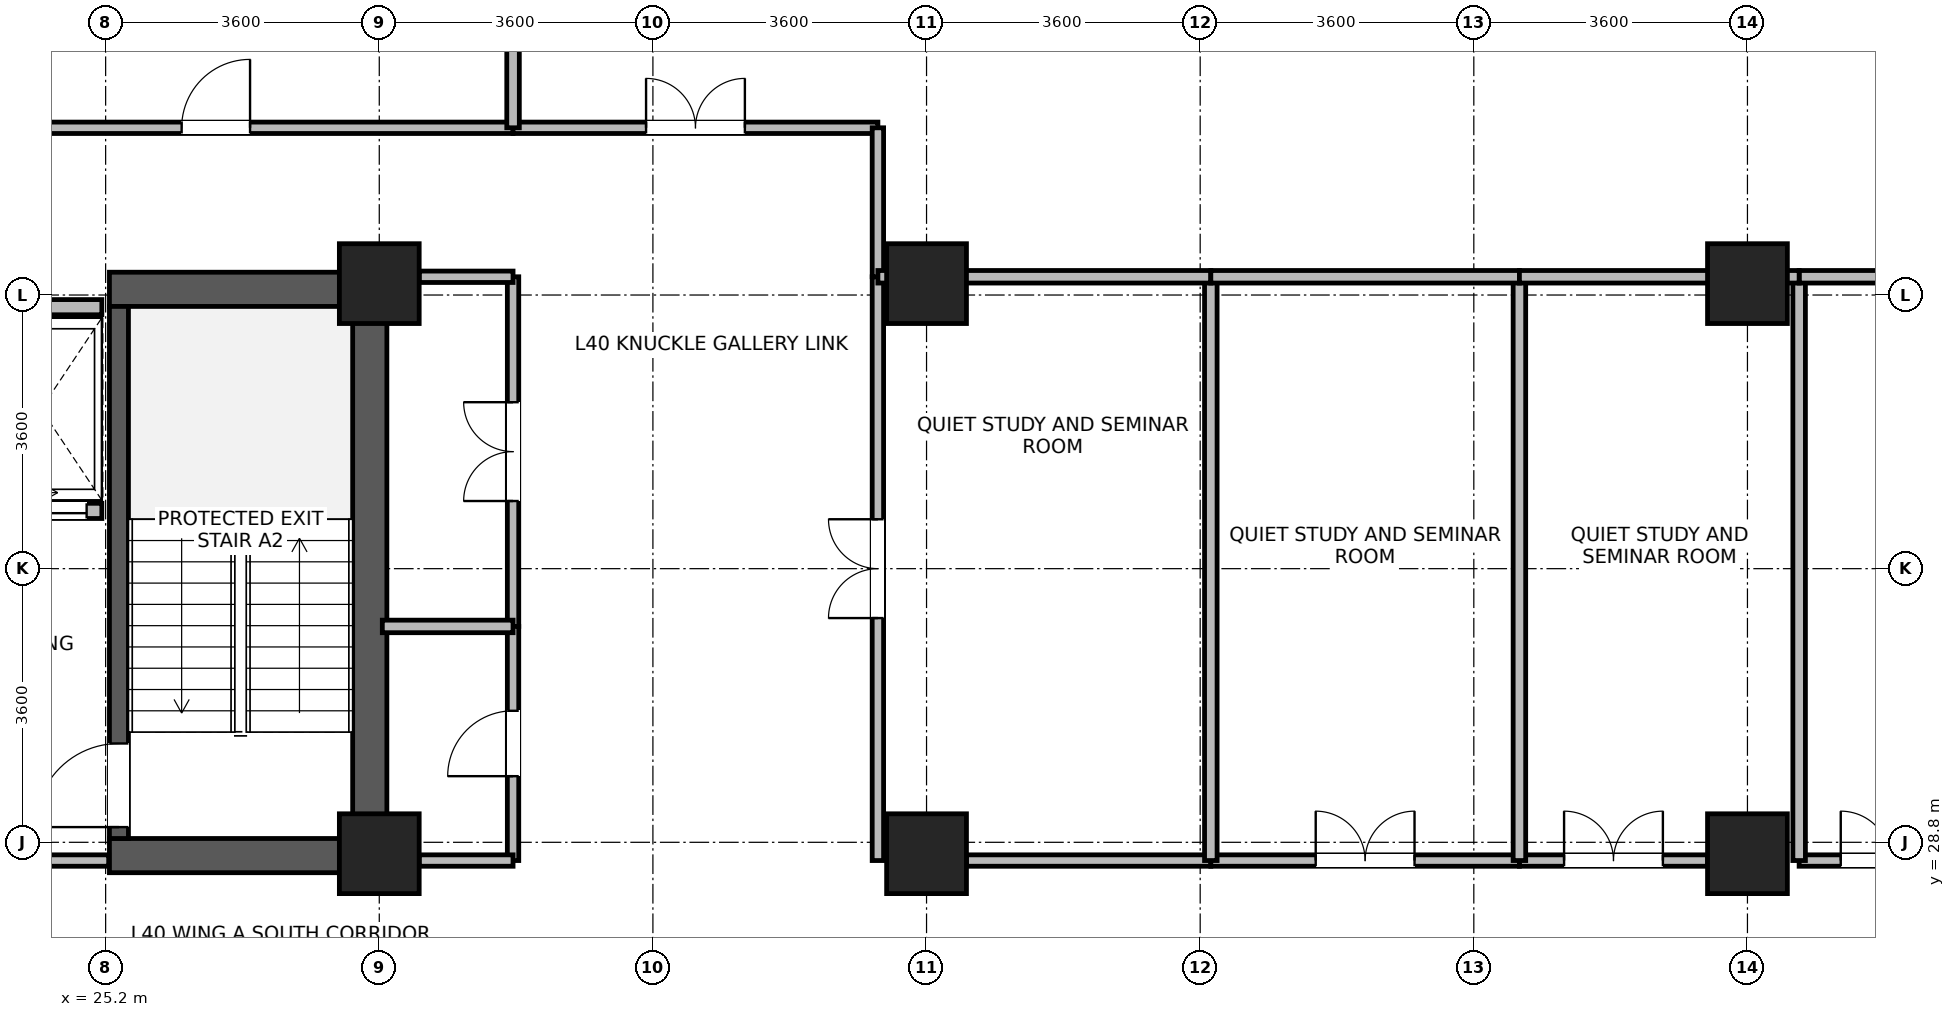
"""IFC4 building model, lengths in metres.
Left out: names, types, materials, properties, quantities, classifications, styles, units other than length and angle.
Written with IfcOpenShell. Run it as: python <this file> out.ifc"""

import sys

from ifc_helpers import new_model, si_unit, direction, frame, frame_2d, origin, origin_2d, place, context, subcontext, project, spatial, rectangle, extrude, source, transform, mapped, element, fill, save


model = new_model("IFC4")
c1 = context("Model", 3, precision=1e-05, world=origin(), true_north=direction((0.0, 1.0)))
c2 = subcontext(c1, "Body", "Model", "MODEL_VIEW")
j1 = project(units=[si_unit("LENGTHUNIT", "METRE"), si_unit("PLANEANGLEUNIT", "RADIAN")], contexts=[c1])
p1 = place(None, origin())
s1 = spatial("IfcSite", under=j1, at=p1, CompositionType="ELEMENT")
p2 = place(p1, origin())
s2 = spatial("IfcBuilding", under=s1, at=p2, CompositionType="ELEMENT")
p3 = place(p2, frame((0.0, 0.0, 158.7)))
s3 = spatial("IfcBuildingStorey", under=s2, at=p3, CompositionType="ELEMENT", Elevation=158.7)
p4 = place(p3, frame((28.675, 28.4, 0.0), z_axis=(0.0, 0.0, 1.0), x_axis=(0.0, 1.0, 0.0)))
e1 = element("IfcWall", 1, at=p4, inside=s3, PredefinedType="SHEAR", context=c2, shape_type="SweptSolid", body=[
    extrude(rectangle(XDim=7.9, YDim=0.45, at=frame_2d((3.95, 0.0))), origin(), (0.0, 0.0, 1.0), 3.46),
])
for number, where, z_axis, x_axis in (
    (2, (25.25, 28.625, 0.0), (0.0, 0.0, 1.0), (1.0, 0.0, 0.0)),
    (3, (25.25, 36.075, 0.0), (0.0, 0.0, 1.0), (1.0, 0.0, 0.0)),
):
    element("IfcWall", number, at=place(p3, frame(where, z_axis=z_axis, x_axis=x_axis)), inside=s3, PredefinedType="SHEAR", context=c2, shape_type="SweptSolid", body=[
        extrude(rectangle(XDim=3.2, YDim=0.45, at=frame_2d((1.6, 0.0))), origin(), (0.0, 0.0, 1.0), 3.46),
    ])
p5 = place(p3, frame((25.375, 28.85, 0.0), z_axis=(0.0, 0.0, 1.0), x_axis=(0.0, 1.0, 0.0)))
e4 = element("IfcWall", 4, at=p5, inside=s3, PredefinedType="SHEAR", context=c2, shape_type="SweptSolid", body=[
    extrude(rectangle(XDim=7.0, YDim=0.25, at=frame_2d((3.5, 0.0))), origin(), (0.0, 0.0, 1.0), 3.46),
])
p6 = place(p5, frame((0.15, 0.0, 0.0)))
e5 = element("IfcOpeningElement", 5, at=p6, cuts=e4, PredefinedType="OPENING", context=c2, shape_type="SweptSolid", body=[
    extrude(rectangle(XDim=1.1, YDim=2.08, at=frame_2d((0.55, 1.04))), frame((0.0, 0.135, 0.0), z_axis=(0.0, -1.0, 0.0), x_axis=(1.0, 0.0, 0.0)), (0.0, 0.0, 1.0), 0.27),
])
m1 = source(origin(), c2, "Body", "SweptSolid", [
    extrude(rectangle(XDim=1.05, YDim=1.05, at=origin_2d()), origin(), (0.0, 0.0, 1.0), 3.7),
])
for number, where, z_axis, x_axis in (
    (6, (28.8, 28.65, 0.0), (0.0, 0.0, 1.0), (1.0, 0.0, 0.0)),
    (7, (28.8, 36.15, 0.0), (0.0, 0.0, 1.0), (1.0, 0.0, 0.0)),
    (8, (36.0, 28.65, 0.0), (0.0, 0.0, 1.0), (1.0, 0.0, 0.0)),
    (9, (36.0, 36.15, 0.0), (0.0, 0.0, 1.0), (1.0, 0.0, 0.0)),
    (10, (46.8, 28.65, 0.0), (0.0, 0.0, 1.0), (1.0, 0.0, 0.0)),
    (11, (46.8, 36.15, 0.0), (0.0, 0.0, 1.0), (1.0, 0.0, 0.0)),
):
    element("IfcColumn", number, at=place(p3, frame(where, z_axis=z_axis, x_axis=x_axis)), inside=s3, PredefinedType="COLUMN", context=c2, shape_type="MappedRepresentation", body=[
        mapped(m1, transform((0.0, 0.0, 0.0), x_axis=(1.0, 0.0, 0.0), y_axis=(0.0, 1.0, 0.0), z_axis=(0.0, 0.0, 1.0), scale=1.0)),
    ])
p7 = place(p3, frame((23.55, 33.16, 0.0), z_axis=(0.0, 0.0, 1.0), x_axis=(1.0, 0.0, 0.0)))
e12 = element("IfcWall", 12, at=p7, inside=s3, PredefinedType="PARTITIONING", context=c2, shape_type="SweptSolid", body=[
    extrude(rectangle(XDim=1.6, YDim=0.2, at=frame_2d((0.8, 0.0))), origin(), (0.0, 0.0, 1.0), 3.44),
])
p8 = place(p7, frame((0.2, 0.0, 0.0)))
e13 = element("IfcOpeningElement", 13, at=p8, cuts=e12, PredefinedType="OPENING", context=c2, shape_type="SweptSolid", body=[
    extrude(rectangle(XDim=1.2, YDim=2.12, at=frame_2d((0.6, 1.06))), frame((0.0, 0.11, 0.0), z_axis=(0.0, -1.0, 0.0), x_axis=(1.0, 0.0, 0.0)), (0.0, 0.0, 1.0), 0.22),
])
p9 = place(p3, frame((23.55, 35.84, 0.0), z_axis=(0.0, 0.0, 1.0), x_axis=(1.0, 0.0, 0.0)))
e14 = element("IfcWall", 14, at=p9, inside=s3, PredefinedType="PARTITIONING", context=c2, shape_type="SweptSolid", body=[
    extrude(rectangle(XDim=1.6, YDim=0.2, at=frame_2d((0.8, 0.0))), origin(), (0.0, 0.0, 1.0), 2.44),
])
p10 = place(p3, frame((22.74, 38.2, 0.0), z_axis=(0.0, 0.0, 1.0), x_axis=(1.0, 0.0, 0.0)))
e15 = element("IfcWall", 15, at=p10, inside=s3, PredefinedType="PARTITIONING", context=c2, shape_type="SweptSolid", body=[
    extrude(rectangle(XDim=7.82, YDim=0.15, at=frame_2d((3.91, 0.0))), origin(), (0.0, 0.0, 1.0), 3.44),
])
p11 = place(p10, frame((3.46, 0.0, 0.0)))
e16 = element("IfcOpeningElement", 16, at=p11, cuts=e15, PredefinedType="OPENING", context=c2, shape_type="SweptSolid", body=[
    extrude(rectangle(XDim=0.9, YDim=2.08, at=frame_2d((0.45, 1.04))), frame((0.0, 0.085, 0.0), z_axis=(0.0, -1.0, 0.0), x_axis=(1.0, 0.0, 0.0)), (0.0, 0.0, 1.0), 0.17),
])
p12 = place(p3, frame((35.36, 28.56, 0.0), z_axis=(0.0, 0.0, 1.0), x_axis=(0.0, 1.0, 0.0)))
e17 = element("IfcWall", 17, at=p12, inside=s3, PredefinedType="PARTITIONING", context=c2, shape_type="SweptSolid", body=[
    extrude(rectangle(XDim=7.68, YDim=0.15, at=frame_2d((3.84, 0.0))), origin(), (0.0, 0.0, 1.0), 3.44),
])
p13 = place(p12, frame((3.19, 0.0, 0.0)))
e18 = element("IfcOpeningElement", 18, at=p13, cuts=e17, PredefinedType="OPENING", context=c2, shape_type="SweptSolid", body=[
    extrude(rectangle(XDim=1.3, YDim=2.12, at=frame_2d((0.65, 1.06))), frame((0.0, 0.085, 0.0), z_axis=(0.0, -1.0, 0.0), x_axis=(1.0, 0.0, 0.0)), (0.0, 0.0, 1.0), 0.17),
])
p14 = place(p3, frame((47.48, 28.56, 0.0), z_axis=(0.0, 0.0, 1.0), x_axis=(1.0, 0.0, 0.0)))
e19 = element("IfcWall", 19, at=p14, inside=s3, PredefinedType="PARTITIONING", context=c2, shape_type="SweptSolid", body=[
    extrude(rectangle(XDim=2.395, YDim=0.15, at=frame_2d((1.198, 0.0))), origin(), (0.0, 0.0, 1.0), 2.84),
])
p15 = place(p14, frame((0.548, 0.0, 0.0)))
e20 = element("IfcOpeningElement", 20, at=p15, cuts=e19, PredefinedType="OPENING", context=c2, shape_type="SweptSolid", body=[
    extrude(rectangle(XDim=1.3, YDim=2.12, at=frame_2d((0.65, 1.06))), frame((0.0, 0.085, 0.0), z_axis=(0.0, -1.0, 0.0), x_axis=(1.0, 0.0, 0.0)), (0.0, 0.0, 1.0), 0.17),
])
p16 = place(p3, frame((30.56, 38.2, 0.0), z_axis=(0.0, 0.0, 1.0), x_axis=(1.0, 0.0, 0.0)))
e21 = element("IfcWall", 21, at=p16, inside=s3, PredefinedType="PARTITIONING", context=c2, shape_type="SweptSolid", body=[
    extrude(rectangle(XDim=4.8, YDim=0.15, at=frame_2d((2.4, 0.0))), origin(), (0.0, 0.0, 1.0), 3.44),
])
p17 = place(p16, frame((1.75, 0.0, 0.0)))
e22 = element("IfcOpeningElement", 22, at=p17, cuts=e21, PredefinedType="OPENING", context=c2, shape_type="SweptSolid", body=[
    extrude(rectangle(XDim=1.3, YDim=2.12, at=frame_2d((0.65, 1.06))), frame((0.0, 0.085, 0.0), z_axis=(0.0, -1.0, 0.0), x_axis=(1.0, 0.0, 0.0)), (0.0, 0.0, 1.0), 0.17),
])
p18 = place(p3, frame((30.56, 31.64, 0.0), z_axis=(0.0, 0.0, 1.0), x_axis=(0.0, 1.0, 0.0)))
e23 = element("IfcWall", 23, at=p18, inside=s3, PredefinedType="PARTITIONING", context=c2, shape_type="SweptSolid", body=[
    extrude(rectangle(XDim=4.6, YDim=0.15, at=frame_2d((2.3, 0.0))), origin(), (0.0, 0.0, 1.0), 3.44),
])
p19 = place(p18, frame((1.65, 0.0, 0.0)))
e24 = element("IfcOpeningElement", 24, at=p19, cuts=e23, PredefinedType="OPENING", context=c2, shape_type="SweptSolid", body=[
    extrude(rectangle(XDim=1.3, YDim=2.12, at=frame_2d((0.65, 1.06))), frame((0.0, 0.085, 0.0), z_axis=(0.0, -1.0, 0.0), x_axis=(1.0, 0.0, 0.0)), (0.0, 0.0, 1.0), 0.17),
])
p20 = place(p3, frame((36.525, 28.56, 0.0), z_axis=(0.0, 0.0, 1.0), x_axis=(1.0, 0.0, 0.0)))
e25 = element("IfcWall", 25, at=p20, inside=s3, PredefinedType="PARTITIONING", context=c2, shape_type="SweptSolid", body=[
    extrude(rectangle(XDim=3.215, YDim=0.15, at=frame_2d((1.607, 0.0))), origin(), (0.0, 0.0, 1.0), 2.84),
])
p21 = place(p3, frame((39.74, 28.56, 0.0), z_axis=(0.0, 0.0, 1.0), x_axis=(1.0, 0.0, 0.0)))
e26 = element("IfcWall", 26, at=p21, inside=s3, PredefinedType="PARTITIONING", context=c2, shape_type="SweptSolid", body=[
    extrude(rectangle(XDim=4.06, YDim=0.15, at=frame_2d((2.03, 0.0))), origin(), (0.0, 0.0, 1.0), 2.84),
])
p22 = place(p21, frame((1.38, 0.0, 0.0)))
e27 = element("IfcOpeningElement", 27, at=p22, cuts=e26, PredefinedType="OPENING", context=c2, shape_type="SweptSolid", body=[
    extrude(rectangle(XDim=1.3, YDim=2.12, at=frame_2d((0.65, 1.06))), frame((0.0, 0.085, 0.0), z_axis=(0.0, -1.0, 0.0), x_axis=(1.0, 0.0, 0.0)), (0.0, 0.0, 1.0), 0.17),
])
p23 = place(p3, frame((43.8, 28.56, 0.0), z_axis=(0.0, 0.0, 1.0), x_axis=(1.0, 0.0, 0.0)))
e28 = element("IfcWall", 28, at=p23, inside=s3, PredefinedType="PARTITIONING", context=c2, shape_type="SweptSolid", body=[
    extrude(rectangle(XDim=2.475, YDim=0.15, at=frame_2d((1.237, 0.0))), origin(), (0.0, 0.0, 1.0), 2.84),
])
p24 = place(p23, frame((0.587, 0.0, 0.0)))
e29 = element("IfcOpeningElement", 29, at=p24, cuts=e28, PredefinedType="OPENING", context=c2, shape_type="SweptSolid", body=[
    extrude(rectangle(XDim=1.3, YDim=2.12, at=frame_2d((0.65, 1.06))), frame((0.0, 0.085, 0.0), z_axis=(0.0, -1.0, 0.0), x_axis=(1.0, 0.0, 0.0)), (0.0, 0.0, 1.0), 0.17),
])
p25 = place(p3, frame((30.56, 28.56, 0.0), z_axis=(0.0, 0.0, 1.0), x_axis=(0.0, 1.0, 0.0)))
e30 = element("IfcWall", 30, at=p25, inside=s3, PredefinedType="PARTITIONING", context=c2, shape_type="SweptSolid", body=[
    extrude(rectangle(XDim=3.08, YDim=0.15, at=frame_2d((1.54, 0.0))), origin(), (0.0, 0.0, 1.0), 3.44),
])
p26 = place(p25, frame((1.11, 0.0, 0.0)))
e31 = element("IfcOpeningElement", 31, at=p26, cuts=e30, PredefinedType="OPENING", context=c2, shape_type="SweptSolid", body=[
    extrude(rectangle(XDim=0.86, YDim=2.02, at=frame_2d((0.43, 1.01))), frame((0.0, 0.085, 0.0), z_axis=(0.0, -1.0, 0.0), x_axis=(1.0, 0.0, 0.0)), (0.0, 0.0, 1.0), 0.17),
])
p27 = place(p3, frame((35.36, 36.24, 0.0), z_axis=(0.0, 0.0, 1.0), x_axis=(0.0, 1.0, 0.0)))
e32 = element("IfcWall", 32, at=p27, inside=s3, PredefinedType="PARTITIONING", context=c2, shape_type="SweptSolid", body=[
    extrude(rectangle(XDim=1.96, YDim=0.15, at=frame_2d((0.98, 0.0))), origin(), (0.0, 0.0, 1.0), 3.44),
])
for number, where, z_axis, x_axis in (
    (33, (29.325, 28.56, 0.0), (0.0, 0.0, 1.0), (1.0, 0.0, 0.0)),
    (34, (29.325, 36.24, 0.0), (0.0, 0.0, 1.0), (1.0, 0.0, 0.0)),
):
    element("IfcWall", number, at=place(p3, frame(where, z_axis=z_axis, x_axis=x_axis)), inside=s3, PredefinedType="PARTITIONING", context=c2, shape_type="SweptSolid", body=[
        extrude(rectangle(XDim=1.235, YDim=0.15, at=frame_2d((0.618, 0.0))), origin(), (0.0, 0.0, 1.0), 2.84),
    ])
for number, where, z_axis, x_axis in (
    (35, (39.74, 28.56, 0.0), (0.0, 0.0, 1.0), (0.0, 1.0, 0.0)),
    (36, (43.8, 28.56, 0.0), (0.0, 0.0, 1.0), (0.0, 1.0, 0.0)),
    (37, (47.48, 28.56, 0.0), (0.0, 0.0, 1.0), (0.0, 1.0, 0.0)),
):
    element("IfcWall", number, at=place(p3, frame(where, z_axis=z_axis, x_axis=x_axis)), inside=s3, PredefinedType="PARTITIONING", context=c2, shape_type="SweptSolid", body=[
        extrude(rectangle(XDim=7.68, YDim=0.165, at=frame_2d((3.84, 0.0))), origin(), (0.0, 0.0, 1.0), 3.44),
    ])
p28 = place(p3, frame((47.48, 36.24, 0.0), z_axis=(0.0, 0.0, 1.0), x_axis=(1.0, 0.0, 0.0)))
e38 = element("IfcWall", 38, at=p28, inside=s3, PredefinedType="PARTITIONING", context=c2, shape_type="SweptSolid", body=[
    extrude(rectangle(XDim=6.888, YDim=0.165, at=frame_2d((3.444, 0.0))), origin(), (0.0, 0.0, 1.0), 2.84),
])
p29 = place(p3, frame((30.56, 38.2, 0.0), z_axis=(0.0, 0.0, 1.0), x_axis=(0.0, 1.0, 0.0)))
e39 = element("IfcWall", 39, at=p29, inside=s3, PredefinedType="PARTITIONING", context=c2, shape_type="SweptSolid", body=[
    extrude(rectangle(XDim=4.868, YDim=0.165, at=frame_2d((2.434, 0.0))), origin(), (0.0, 0.0, 1.0), 3.44),
])
p30 = place(p3, frame((35.36, 36.24, 0.0), z_axis=(0.0, 0.0, 1.0), x_axis=(1.0, 0.0, 0.0)))
e40 = element("IfcWall", 40, at=p30, inside=s3, PredefinedType="PARTITIONING", context=c2, shape_type="SweptSolid", body=[
    extrude(rectangle(XDim=4.38, YDim=0.165, at=frame_2d((2.19, 0.0))), origin(), (0.0, 0.0, 1.0), 2.84),
])
p31 = place(p3, frame((39.74, 36.24, 0.0), z_axis=(0.0, 0.0, 1.0), x_axis=(1.0, 0.0, 0.0)))
e41 = element("IfcWall", 41, at=p31, inside=s3, PredefinedType="PARTITIONING", context=c2, shape_type="SweptSolid", body=[
    extrude(rectangle(XDim=4.06, YDim=0.165, at=frame_2d((2.03, 0.0))), origin(), (0.0, 0.0, 1.0), 2.84),
])
p32 = place(p3, frame((43.8, 36.24, 0.0), z_axis=(0.0, 0.0, 1.0), x_axis=(1.0, 0.0, 0.0)))
e42 = element("IfcWall", 42, at=p32, inside=s3, PredefinedType="PARTITIONING", context=c2, shape_type="SweptSolid", body=[
    extrude(rectangle(XDim=3.68, YDim=0.165, at=frame_2d((1.84, 0.0))), origin(), (0.0, 0.0, 1.0), 2.84),
])
p33 = place(p3, frame((21.76, 28.56, 0.0), z_axis=(0.0, 0.0, 1.0), x_axis=(1.0, 0.0, 0.0)))
e43 = element("IfcWall", 43, at=p33, inside=s3, PredefinedType="PARTITIONING", context=c2, shape_type="SweptSolid", body=[
    extrude(rectangle(XDim=3.48, YDim=0.15, at=frame_2d((1.74, 0.0))), origin(), (0.0, 0.0, 1.0), 2.44),
])
p34 = place(p33, frame((0.99, 0.0, 0.0)))
e44 = element("IfcOpeningElement", 44, at=p34, cuts=e43, PredefinedType="OPENING", context=c2, shape_type="SweptSolid", body=[
    extrude(rectangle(XDim=1.5, YDim=2.1, at=frame_2d((0.75, 1.05))), frame((0.0, 0.085, 0.0), z_axis=(0.0, -1.0, 0.0), x_axis=(1.0, 0.0, 0.0)), (0.0, 0.0, 1.0), 0.17),
])
p35 = place(p3, frame((28.84, 31.64, 0.0), z_axis=(0.0, 0.0, 1.0), x_axis=(1.0, 0.0, 0.0)))
e45 = element("IfcWall", 45, at=p35, inside=s3, PredefinedType="PARTITIONING", context=c2, shape_type="SweptSolid", body=[
    extrude(rectangle(XDim=1.72, YDim=0.165, at=frame_2d((0.86, 0.0))), origin(), (0.0, 0.0, 1.0), 3.44),
])
p36 = place(p6, origin())
e46 = element("IfcDoor", 46, at=p36, inside=s3, OperationType="SINGLE_SWING_LEFT", PredefinedType="DOOR", context=c2, shape_type="SweptSolid", body=[
    extrude(rectangle(XDim=1.1, YDim=2.08, at=frame_2d((0.55, 1.04))), frame((0.0, 0.025, 0.0), z_axis=(0.0, -1.0, 0.0), x_axis=(1.0, 0.0, 0.0)), (0.0, 0.0, 1.0), 0.05),
])
fill(e5, e46)
p37 = place(p8, origin())
e47 = element("IfcDoor", 47, at=p37, inside=s3, OperationType="SLIDING_TO_RIGHT", PredefinedType="DOOR", context=c2, shape_type="SweptSolid", body=[
    extrude(rectangle(XDim=1.2, YDim=2.12, at=frame_2d((0.6, 1.06))), frame((0.0, 0.025, 0.0), z_axis=(0.0, -1.0, 0.0), x_axis=(1.0, 0.0, 0.0)), (0.0, 0.0, 1.0), 0.05),
])
fill(e13, e47)
p38 = place(p11, origin())
e48 = element("IfcDoor", 48, at=p38, inside=s3, OperationType="SINGLE_SWING_RIGHT", PredefinedType="DOOR", context=c2, shape_type="SweptSolid", body=[
    extrude(rectangle(XDim=0.9, YDim=2.08, at=frame_2d((0.45, 1.04))), frame((0.0, 0.025, 0.0), z_axis=(0.0, -1.0, 0.0), x_axis=(1.0, 0.0, 0.0)), (0.0, 0.0, 1.0), 0.05),
])
fill(e16, e48)
p39 = place(p13, origin())
e49 = element("IfcDoor", 49, at=p39, inside=s3, OperationType="DOUBLE_DOOR_SINGLE_SWING", PredefinedType="DOOR", context=c2, shape_type="SweptSolid", body=[
    extrude(rectangle(XDim=1.3, YDim=2.12, at=frame_2d((0.65, 1.06))), frame((0.0, 0.025, 0.0), z_axis=(0.0, -1.0, 0.0), x_axis=(1.0, 0.0, 0.0)), (0.0, 0.0, 1.0), 0.05),
])
fill(e18, e49)
p40 = place(p15, origin())
e50 = element("IfcDoor", 50, at=p40, inside=s3, OperationType="DOUBLE_DOOR_SINGLE_SWING", PredefinedType="DOOR", context=c2, shape_type="SweptSolid", body=[
    extrude(rectangle(XDim=1.3, YDim=2.12, at=frame_2d((0.65, 1.06))), frame((0.0, 0.025, 0.0), z_axis=(0.0, -1.0, 0.0), x_axis=(1.0, 0.0, 0.0)), (0.0, 0.0, 1.0), 0.05),
])
fill(e20, e50)
p41 = place(p17, origin())
e51 = element("IfcDoor", 51, at=p41, inside=s3, OperationType="DOUBLE_DOOR_SINGLE_SWING", PredefinedType="DOOR", context=c2, shape_type="SweptSolid", body=[
    extrude(rectangle(XDim=1.3, YDim=2.12, at=frame_2d((0.65, 1.06))), frame((0.0, 0.025, 0.0), z_axis=(0.0, -1.0, 0.0), x_axis=(1.0, 0.0, 0.0)), (0.0, 0.0, 1.0), 0.05),
])
fill(e22, e51)
p42 = place(p19, origin())
e52 = element("IfcDoor", 52, at=p42, inside=s3, OperationType="DOUBLE_DOOR_SINGLE_SWING", PredefinedType="DOOR", context=c2, shape_type="SweptSolid", body=[
    extrude(rectangle(XDim=1.3, YDim=2.12, at=frame_2d((0.65, 1.06))), frame((0.0, 0.025, 0.0), z_axis=(0.0, -1.0, 0.0), x_axis=(1.0, 0.0, 0.0)), (0.0, 0.0, 1.0), 0.05),
])
fill(e24, e52)
p43 = place(p22, origin())
e53 = element("IfcDoor", 53, at=p43, inside=s3, OperationType="DOUBLE_DOOR_SINGLE_SWING", PredefinedType="DOOR", context=c2, shape_type="SweptSolid", body=[
    extrude(rectangle(XDim=1.3, YDim=2.12, at=frame_2d((0.65, 1.06))), frame((0.0, 0.025, 0.0), z_axis=(0.0, -1.0, 0.0), x_axis=(1.0, 0.0, 0.0)), (0.0, 0.0, 1.0), 0.05),
])
fill(e27, e53)
p44 = place(p24, origin())
e54 = element("IfcDoor", 54, at=p44, inside=s3, OperationType="DOUBLE_DOOR_SINGLE_SWING", PredefinedType="DOOR", context=c2, shape_type="SweptSolid", body=[
    extrude(rectangle(XDim=1.3, YDim=2.12, at=frame_2d((0.65, 1.06))), frame((0.0, 0.025, 0.0), z_axis=(0.0, -1.0, 0.0), x_axis=(1.0, 0.0, 0.0)), (0.0, 0.0, 1.0), 0.05),
])
fill(e29, e54)
p45 = place(p26, origin())
e55 = element("IfcDoor", 55, at=p45, inside=s3, OperationType="SINGLE_SWING_LEFT", PredefinedType="DOOR", context=c2, shape_type="SweptSolid", body=[
    extrude(rectangle(XDim=0.86, YDim=2.02, at=frame_2d((0.43, 1.01))), frame((0.0, 0.025, 0.0), z_axis=(0.0, -1.0, 0.0), x_axis=(1.0, 0.0, 0.0)), (0.0, 0.0, 1.0), 0.05),
])
fill(e31, e55)
save(model, sys.argv[1])
